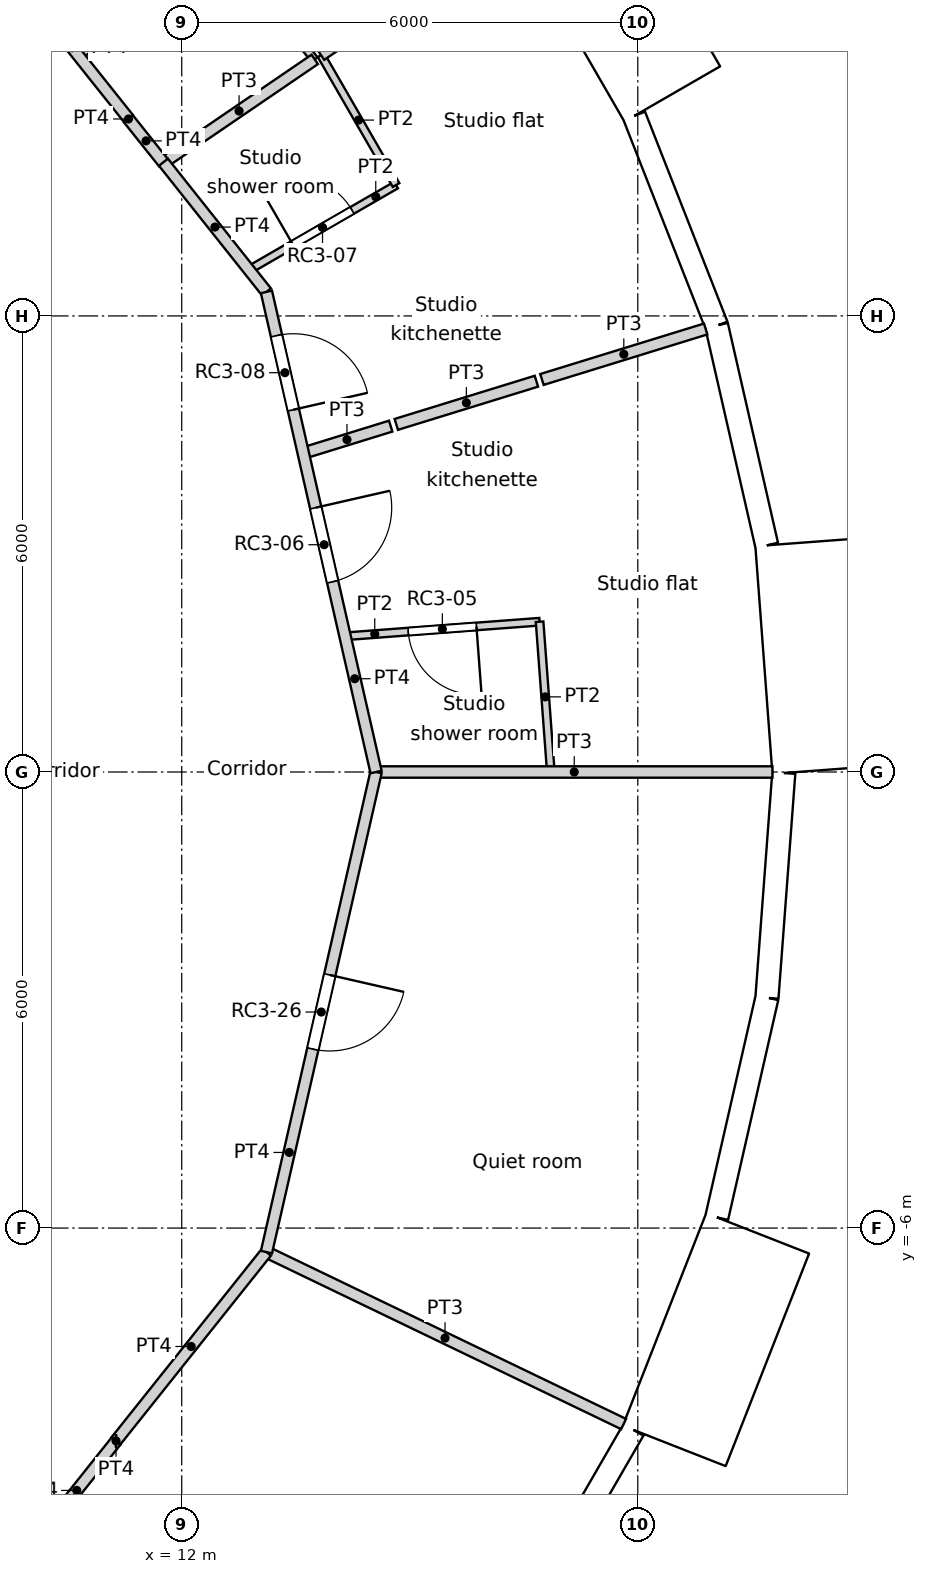
"""IFC4 building model, lengths in metres.
Left out: names, types, materials, properties, quantities, classifications, styles, units other than length and angle.
Written with IfcOpenShell. Run it as: python <this file> out.ifc"""

import sys

from ifc_helpers import new_model, si_unit, direction, frame, frame_2d, origin, origin_2d, place, context, subcontext, project, spatial, rectangle, circle, extrude, element, fill, save


model = new_model("IFC4")
c1 = context("Model", 3, precision=1e-05, world=origin(), true_north=direction((0.0, 1.0)))
c2 = subcontext(c1, "Body", "Model", "MODEL_VIEW")
j1 = project(units=[si_unit("LENGTHUNIT", "METRE"), si_unit("PLANEANGLEUNIT", "RADIAN")], contexts=[c1])
p1 = place(None, origin())
s1 = spatial("IfcSite", under=j1, at=p1, CompositionType="ELEMENT")
p2 = place(p1, origin())
s2 = spatial("IfcBuilding", under=s1, at=p2, CompositionType="ELEMENT")
p3 = place(p2, frame((0.0, 0.0, 252.6)))
s3 = spatial("IfcBuildingStorey", under=s2, at=p3, CompositionType="ELEMENT", Elevation=252.6)
for number, where, z_axis, x_axis in (
    (1, (18.822, 0.0, 0.0), (0.0, 0.0, 1.0), (1.0, 0.0, 0.0)),
    (2, (17.986, 5.548, 0.0), (0.0, 0.0, 1.0), (1.0, 0.0, 0.0)),
    (3, (17.986, -5.548, 0.0), (0.0, 0.0, 1.0), (1.0, 0.0, 0.0)),
):
    element("IfcColumn", number, at=place(p3, frame(where, z_axis=z_axis, x_axis=x_axis)), inside=s3, PredefinedType="COLUMN", context=c2, shape_type="SweptSolid", body=[
        extrude(circle(Radius=0.55, at=origin_2d()), origin(), (0.0, 0.0, 1.0), 3.6),
    ])
p4 = place(p3, frame((20.496, 0.032, -0.35), z_axis=(0.0, 0.0, 1.0), x_axis=(-0.074785902127, 0.997199613339, 0.0)))
e4 = element("IfcWall", 4, at=p4, inside=s3, PredefinedType="ELEMENTEDWALL", context=c2, shape_type="SweptSolid", body=[
    extrude(rectangle(XDim=3.0, YDim=1.45, at=frame_2d((1.5, 0.0))), origin(), (0.0, 0.0, 1.0), 3.6),
])
p5 = place(p4, frame((1.5, 0.0, 1.9)))
e5 = element("IfcOpeningElement", 5, at=p5, cuts=e4, PredefinedType="OPENING", context=c2, shape_type="SweptSolid", body=[
    extrude(circle(Radius=0.9, at=origin_2d()), frame((0.0, 0.735, 0.0), z_axis=(0.0, -1.0, 0.0), x_axis=(1.0, 0.0, 0.0)), (0.0, 0.0, 1.0), 1.47),
])
p6 = place(p3, frame((19.696, 2.984, 0.0), z_axis=(0.0, 0.0, 1.0), x_axis=(-0.222529389789, 0.974925982155, 0.0)))
e6 = element("IfcWall", 6, at=p6, inside=s3, PredefinedType="SOLIDWALL", context=c2, shape_type="SweptSolid", body=[
    extrude(rectangle(XDim=2.962, YDim=0.3, at=frame_2d((1.481, 0.0))), origin(), (0.0, 0.0, 1.0), 3.25),
])
p7 = place(p6, frame((1.481, 0.0, 1.55)))
e7 = element("IfcOpeningElement", 7, at=p7, cuts=e6, PredefinedType="OPENING", context=c2, shape_type="SweptSolid", body=[
    extrude(circle(Radius=0.9, at=origin_2d()), frame((0.0, 0.16, 0.0), z_axis=(0.0, -1.0, 0.0), x_axis=(1.0, 0.0, 0.0)), (0.0, 0.0, 1.0), 0.32),
])
p8 = place(p3, frame((19.037, 5.872, 0.0), z_axis=(0.0, 0.0, 1.0), x_axis=(-0.36530043032, 0.930889679612, 0.0)))
e8 = element("IfcWall", 8, at=p8, inside=s3, PredefinedType="SOLIDWALL", context=c2, shape_type="SweptSolid", body=[
    extrude(rectangle(XDim=2.962, YDim=0.3, at=frame_2d((1.481, 0.0))), origin(), (0.0, 0.0, 1.0), 3.25),
])
p9 = place(p8, frame((1.481, 0.0, 1.55)))
e9 = element("IfcOpeningElement", 9, at=p9, cuts=e8, PredefinedType="OPENING", context=c2, shape_type="SweptSolid", body=[
    extrude(circle(Radius=0.9, at=origin_2d()), frame((0.0, 0.16, 0.0), z_axis=(0.0, -1.0, 0.0), x_axis=(1.0, 0.0, 0.0)), (0.0, 0.0, 1.0), 0.32),
])
p10 = place(p3, frame((18.452, 8.921, -0.35), z_axis=(0.0, 0.0, 1.0), x_axis=(-0.499990139034, 0.866031096941, 0.0)))
e10 = element("IfcWall", 10, at=p10, inside=s3, PredefinedType="ELEMENTEDWALL", context=c2, shape_type="SweptSolid", body=[
    extrude(rectangle(XDim=3.0, YDim=1.45, at=frame_2d((1.5, 0.0))), origin(), (0.0, 0.0, 1.0), 3.6),
])
p11 = place(p10, frame((1.5, 0.0, 1.9)))
e11 = element("IfcOpeningElement", 11, at=p11, cuts=e10, PredefinedType="OPENING", context=c2, shape_type="SweptSolid", body=[
    extrude(circle(Radius=0.9, at=origin_2d()), frame((0.0, 0.735, 0.0), z_axis=(0.0, -1.0, 0.0), x_axis=(1.0, 0.0, 0.0)), (0.0, 0.0, 1.0), 1.47),
])
p12 = place(p3, frame((16.46, -11.222, 0.0), z_axis=(0.0, 0.0, 1.0), x_axis=(0.499950756475, 0.86605383268, 0.0)))
e12 = element("IfcWall", 12, at=p12, inside=s3, PredefinedType="SOLIDWALL", context=c2, shape_type="SweptSolid", body=[
    extrude(rectangle(XDim=2.962, YDim=0.3, at=frame_2d((1.481, 0.0))), origin(), (0.0, 0.0, 1.0), 3.25),
])
p13 = place(p12, frame((1.481, 0.0, 1.55)))
e13 = element("IfcOpeningElement", 13, at=p13, cuts=e12, PredefinedType="OPENING", context=c2, shape_type="SweptSolid", body=[
    extrude(circle(Radius=0.9, at=origin_2d()), frame((0.0, 0.16, 0.0), z_axis=(0.0, -1.0, 0.0), x_axis=(1.0, 0.0, 0.0)), (0.0, 0.0, 1.0), 0.32),
])
p14 = place(p3, frame((18.48, -8.864, -0.35), z_axis=(0.0, 0.0, 1.0), x_axis=(0.36537792632, 0.93085926485, 0.0)))
e14 = element("IfcWall", 14, at=p14, inside=s3, PredefinedType="ELEMENTEDWALL", context=c2, shape_type="SweptSolid", body=[
    extrude(rectangle(XDim=3.0, YDim=1.45, at=frame_2d((1.5, 0.0))), origin(), (0.0, 0.0, 1.0), 3.6),
])
p15 = place(p14, frame((1.5, 0.0, 1.9)))
e15 = element("IfcOpeningElement", 15, at=p15, cuts=e14, PredefinedType="OPENING", context=c2, shape_type="SweptSolid", body=[
    extrude(circle(Radius=0.9, at=origin_2d()), frame((0.0, 0.735, 0.0), z_axis=(0.0, -1.0, 0.0), x_axis=(1.0, 0.0, 0.0)), (0.0, 0.0, 1.0), 1.47),
])
p16 = place(p3, frame((19.04, -5.857, 0.0), z_axis=(0.0, 0.0, 1.0), x_axis=(0.222529389789, 0.974925982155, 0.0)))
e16 = element("IfcWall", 16, at=p16, inside=s3, PredefinedType="SOLIDWALL", context=c2, shape_type="SweptSolid", body=[
    extrude(rectangle(XDim=2.962, YDim=0.3, at=frame_2d((1.481, 0.0))), origin(), (0.0, 0.0, 1.0), 3.25),
])
p17 = place(p16, frame((1.481, 0.0, 1.55)))
e17 = element("IfcOpeningElement", 17, at=p17, cuts=e16, PredefinedType="OPENING", context=c2, shape_type="SweptSolid", body=[
    extrude(circle(Radius=0.9, at=origin_2d()), frame((0.0, 0.16, 0.0), z_axis=(0.0, -1.0, 0.0), x_axis=(1.0, 0.0, 0.0)), (0.0, 0.0, 1.0), 0.32),
])
p18 = place(p3, frame((19.699, -2.969, 0.0), z_axis=(0.0, 0.0, 1.0), x_axis=(0.07474897196, 0.997202382263, 0.0)))
e18 = element("IfcWall", 18, at=p18, inside=s3, PredefinedType="SOLIDWALL", context=c2, shape_type="SweptSolid", body=[
    extrude(rectangle(XDim=2.962, YDim=0.3, at=frame_2d((1.481, 0.0))), origin(), (0.0, 0.0, 1.0), 3.25),
])
p19 = place(p18, frame((1.481, 0.0, 1.55)))
e19 = element("IfcOpeningElement", 19, at=p19, cuts=e18, PredefinedType="OPENING", context=c2, shape_type="SweptSolid", body=[
    extrude(circle(Radius=0.9, at=origin_2d()), frame((0.0, 0.16, 0.0), z_axis=(0.0, -1.0, 0.0), x_axis=(1.0, 0.0, 0.0)), (0.0, 0.0, 1.0), 0.32),
])
p20 = place(p3, frame((9.079, 11.384, 0.0), z_axis=(0.0, 0.0, 1.0), x_axis=(0.623165080354, -0.782090328944, 0.0)))
e20 = element("IfcWall", 20, at=p20, inside=s3, PredefinedType="PARTITIONING", context=c2, shape_type="SweptSolid", body=[
    extrude(rectangle(XDim=3.564, YDim=0.15, at=frame_2d((1.782, 0.0))), origin(), (0.0, 0.0, 1.0), 3.25),
])
p21 = place(p20, frame((0.332, 0.0, 0.0)))
e21 = element("IfcOpeningElement", 21, at=p21, cuts=e20, PredefinedType="OPENING", context=c2, shape_type="SweptSolid", body=[
    extrude(rectangle(XDim=1.0, YDim=2.1, at=frame_2d((0.5, 1.05))), frame((0.0, 0.075, 0.0), z_axis=(0.0, -1.0, 0.0), x_axis=(1.0, 0.0, 0.0)), (0.0, 0.0, 1.0), 0.15),
])
p22 = place(p3, frame((11.3, 8.586, 0.0), z_axis=(0.0, 0.0, 1.0), x_axis=(0.0, 1.0, 0.0)))
e22 = element("IfcWall", 22, at=p22, inside=s3, PredefinedType="PARTITIONING", context=c2, shape_type="SweptSolid", body=[
    extrude(rectangle(XDim=0.01, YDim=0.15, at=frame_2d((0.005, 0.0))), origin(), (0.0, 0.0, 1.0), 3.25),
])
p23 = place(p3, frame((11.137, -8.8, 0.0), z_axis=(0.0, 0.0, 1.0), x_axis=(-1.0, 0.0, 0.0)))
e23 = element("IfcWall", 23, at=p23, inside=s3, PredefinedType="PARTITIONING", context=c2, shape_type="SweptSolid", body=[
    extrude(rectangle(XDim=0.003, YDim=0.15, at=frame_2d((0.001, 0.0))), origin(), (0.0, 0.0, 1.0), 3.25),
])
p24 = place(p3, frame((10.101, -10.101, 0.0), z_axis=(0.0, 0.0, 1.0), x_axis=(0.623098344652, 0.782143498913, 0.0)))
e24 = element("IfcWall", 24, at=p24, inside=s3, PredefinedType="PARTITIONING", context=c2, shape_type="SweptSolid", body=[
    extrude(rectangle(XDim=1.661, YDim=0.15, at=frame_2d((0.831, 0.0))), origin(), (0.0, 0.0, 1.0), 3.25),
])
p25 = place(p3, frame((13.115, 6.316, 0.0), z_axis=(0.0, 0.0, 1.0), x_axis=(0.222568978642, -0.97491694505, 0.0)))
e25 = element("IfcWall", 25, at=p25, inside=s3, PredefinedType="PARTITIONING", context=c2, shape_type="SweptSolid", body=[
    extrude(rectangle(XDim=6.479, YDim=0.15, at=frame_2d((3.239, 0.0))), origin(), (0.0, 0.0, 1.0), 3.25),
])
p26 = place(p25, frame((2.911, 0.0, 0.0)))
e26 = element("IfcOpeningElement", 26, at=p26, cuts=e25, PredefinedType="OPENING", context=c2, shape_type="SweptSolid", body=[
    extrude(rectangle(XDim=1.0, YDim=2.1, at=frame_2d((0.5, 1.05))), frame((0.0, 0.075, 0.0), z_axis=(0.0, -1.0, 0.0), x_axis=(1.0, 0.0, 0.0)), (0.0, 0.0, 1.0), 0.15),
])
p27 = place(p25, frame((0.59, 0.0, 0.0)))
e27 = element("IfcOpeningElement", 27, at=p27, cuts=e25, PredefinedType="OPENING", context=c2, shape_type="SweptSolid", body=[
    extrude(rectangle(XDim=1.0, YDim=2.1, at=frame_2d((0.5, 1.05))), frame((0.0, 0.075, 0.0), z_axis=(0.0, -1.0, 0.0), x_axis=(1.0, 0.0, 0.0)), (0.0, 0.0, 1.0), 0.15),
])
p28 = place(p3, frame((11.76, 8.022, 0.0), z_axis=(0.0, 0.0, 1.0), x_axis=(0.62206805366, -0.782963177049, 0.0)))
e28 = element("IfcWall", 28, at=p28, inside=s3, PredefinedType="PARTITIONING", context=c2, shape_type="SweptSolid", body=[
    extrude(rectangle(XDim=2.179, YDim=0.15, at=frame_2d((1.089, 0.0))), origin(), (0.0, 0.0, 1.0), 3.25),
])
p29 = place(p3, frame((11.3, 8.592, 0.0), z_axis=(0.0, 0.0, 1.0), x_axis=(0.623405636383, -0.781898594785, 0.0)))
e29 = element("IfcWall", 29, at=p29, inside=s3, PredefinedType="PARTITIONING", context=c2, shape_type="SweptSolid", body=[
    extrude(rectangle(XDim=0.74, YDim=0.15, at=frame_2d((0.37, 0.0))), origin(), (0.0, 0.0, 1.0), 3.25),
])
p30 = place(p3, frame((11.134, -8.8, 0.0), z_axis=(0.0, 0.0, 1.0), x_axis=(0.623476099415, 0.781842409606, 0.0)))
e30 = element("IfcWall", 30, at=p30, inside=s3, PredefinedType="PARTITIONING", context=c2, shape_type="SweptSolid", body=[
    extrude(rectangle(XDim=3.177, YDim=0.15, at=frame_2d((1.589, 0.0))), origin(), (0.0, 0.0, 1.0), 3.25),
])
p31 = place(p3, frame((13.115, -6.316, 0.0), z_axis=(0.0, 0.0, 1.0), x_axis=(0.222568978642, 0.97491694505, 0.0)))
e31 = element("IfcWall", 31, at=p31, inside=s3, PredefinedType="PARTITIONING", context=c2, shape_type="SweptSolid", body=[
    extrude(rectangle(XDim=6.479, YDim=0.15, at=frame_2d((3.239, 0.0))), origin(), (0.0, 0.0, 1.0), 3.25),
])
p32 = place(p31, frame((2.74, 0.0, 0.0)))
e32 = element("IfcOpeningElement", 32, at=p32, cuts=e31, PredefinedType="OPENING", context=c2, shape_type="SweptSolid", body=[
    extrude(rectangle(XDim=1.0, YDim=2.04, at=frame_2d((0.5, 1.02))), frame((0.0, 0.075, 0.0), z_axis=(0.0, -1.0, 0.0), x_axis=(1.0, 0.0, 0.0)), (0.0, 0.0, 1.0), 0.15),
])
p33 = place(p3, frame((16.708, 1.977, 0.0), z_axis=(0.0, 0.0, 1.0), x_axis=(0.074624634103, -0.997211694669, 0.0)))
e33 = element("IfcWall", 33, at=p33, inside=s3, PredefinedType="PARTITIONING", context=c2, shape_type="SweptSolid", body=[
    extrude(rectangle(XDim=1.983, YDim=0.1, at=frame_2d((0.991, 0.0))), origin(), (0.0, 0.0, 1.0), 3.25),
])
p34 = place(p3, frame((14.149, 1.785, 0.0), z_axis=(0.0, 0.0, 1.0), x_axis=(0.997193275785, 0.074870359477, 0.0)))
e34 = element("IfcWall", 34, at=p34, inside=s3, PredefinedType="PARTITIONING", context=c2, shape_type="SweptSolid", body=[
    extrude(rectangle(XDim=2.566, YDim=0.1, at=frame_2d((1.283, 0.0))), origin(), (0.0, 0.0, 1.0), 3.25),
])
p35 = place(p34, frame((0.833, 0.0, 0.0)))
e35 = element("IfcOpeningElement", 35, at=p35, cuts=e34, PredefinedType="OPENING", context=c2, shape_type="SweptSolid", body=[
    extrude(rectangle(XDim=0.9, YDim=2.04, at=frame_2d((0.45, 1.02))), frame((0.0, 0.05, 0.0), z_axis=(0.0, -1.0, 0.0), x_axis=(1.0, 0.0, 0.0)), (0.0, 0.0, 1.0), 0.1),
])
p36 = place(p3, frame((13.599, 4.195, 0.0), z_axis=(0.0, 0.0, 1.0), x_axis=(0.955506647746, 0.294969568115, 0.0)))
e36 = element("IfcWall", 36, at=p36, inside=s3, PredefinedType="PARTITIONING", context=c2, shape_type="SweptSolid", body=[
    extrude(rectangle(XDim=1.203, YDim=0.15, at=frame_2d((0.602, 0.0))), origin(), (0.0, 0.0, 1.0), 3.25),
])
p37 = place(p3, frame((16.739, 5.164, 0.0), z_axis=(0.0, 0.0, 1.0), x_axis=(0.955650111791, 0.294504437715, 0.0)))
e37 = element("IfcWall", 37, at=p37, inside=s3, PredefinedType="PARTITIONING", context=c2, shape_type="SweptSolid", body=[
    extrude(rectangle(XDim=2.254, YDim=0.15, at=frame_2d((1.127, 0.0))), origin(), (0.0, 0.0, 1.0), 3.25),
])
p38 = place(p3, frame((14.557, 0.0, 0.0), z_axis=(0.0, 0.0, 1.0), x_axis=(1.0, 0.0, 0.0)))
e38 = element("IfcWall", 38, at=p38, inside=s3, PredefinedType="PARTITIONING", context=c2, shape_type="SweptSolid", body=[
    extrude(rectangle(XDim=5.214, YDim=0.15, at=frame_2d((2.607, 0.0))), origin(), (0.0, 0.0, 1.0), 3.25),
])
p39 = place(p3, frame((14.823, 4.573, 0.0), z_axis=(0.0, 0.0, 1.0), x_axis=(0.955628343972, 0.294575063773, 0.0)))
e39 = element("IfcWall", 39, at=p39, inside=s3, PredefinedType="PARTITIONING", context=c2, shape_type="SweptSolid", body=[
    extrude(rectangle(XDim=1.929, YDim=0.15, at=frame_2d((0.964, 0.0))), origin(), (0.0, 0.0, 1.0), 3.25),
])
p40 = place(p3, frame((12.885, 6.605, 0.0), z_axis=(0.0, 0.0, 1.0), x_axis=(0.866076416361, 0.499911633214, 0.0)))
e40 = element("IfcWall", 40, at=p40, inside=s3, PredefinedType="PARTITIONING", context=c2, shape_type="SweptSolid", body=[
    extrude(rectangle(XDim=2.234, YDim=0.1, at=frame_2d((1.117, 0.0))), origin(), (0.0, 0.0, 1.0), 3.25),
])
p41 = place(p40, frame((0.667, 0.0, 0.0)))
e41 = element("IfcOpeningElement", 41, at=p41, cuts=e40, PredefinedType="OPENING", context=c2, shape_type="SweptSolid", body=[
    extrude(rectangle(XDim=0.9, YDim=2.04, at=frame_2d((0.45, 1.02))), frame((0.0, 0.05, 0.0), z_axis=(0.0, -1.0, 0.0), x_axis=(1.0, 0.0, 0.0)), (0.0, 0.0, 1.0), 0.1),
])
p42 = place(p3, frame((13.833, 9.431, 0.0), z_axis=(0.0, 0.0, 1.0), x_axis=(0.500143626598, -0.865942465048, 0.0)))
e42 = element("IfcWall", 42, at=p42, inside=s3, PredefinedType="PARTITIONING", context=c2, shape_type="SweptSolid", body=[
    extrude(rectangle(XDim=1.974, YDim=0.1, at=frame_2d((0.987, 0.0))), origin(), (0.0, 0.0, 1.0), 3.25),
])
p43 = place(p3, frame((13.833, 9.431, 0.0), z_axis=(0.0, 0.0, 1.0), x_axis=(0.826152320289, 0.56344684193, 0.0)))
e43 = element("IfcWall", 43, at=p43, inside=s3, PredefinedType="PARTITIONING", context=c2, shape_type="SweptSolid", body=[
    extrude(rectangle(XDim=3.03, YDim=0.15, at=frame_2d((1.515, 0.0))), origin(), (0.0, 0.0, 1.0), 3.25),
])
p44 = place(p3, frame((11.759, 8.017, 0.0), z_axis=(0.0, 0.0, 1.0), x_axis=(0.826143746222, 0.563459413426, 0.0)))
e44 = element("IfcWall", 44, at=p44, inside=s3, PredefinedType="PARTITIONING", context=c2, shape_type="SweptSolid", body=[
    extrude(rectangle(XDim=2.41, YDim=0.15, at=frame_2d((1.205, 0.0))), origin(), (0.0, 0.0, 1.0), 3.25),
])
p45 = place(p3, frame((12.522, 10.91, 0.0), z_axis=(0.0, 0.0, 1.0), x_axis=(0.623330716607, -0.781958322249, 0.0)))
e45 = element("IfcWall", 45, at=p45, inside=s3, PredefinedType="PARTITIONING", context=c2, shape_type="SweptSolid", body=[
    extrude(rectangle(XDim=1.965, YDim=0.1, at=frame_2d((0.983, 0.0))), origin(), (0.0, 0.0, 1.0), 3.25),
])
p46 = place(p3, frame((10.645, 9.413, 0.0), z_axis=(0.0, 0.0, 1.0), x_axis=(0.781830263661, 0.623491330191, 0.0)))
e46 = element("IfcWall", 46, at=p46, inside=s3, PredefinedType="PARTITIONING", context=c2, shape_type="SweptSolid", body=[
    extrude(rectangle(XDim=2.401, YDim=0.1, at=frame_2d((1.2, 0.0))), origin(), (0.0, 0.0, 1.0), 3.25),
])
p47 = place(p46, frame((0.751, 0.0, 0.0)))
e47 = element("IfcOpeningElement", 47, at=p47, cuts=e46, PredefinedType="OPENING", context=c2, shape_type="SweptSolid", body=[
    extrude(rectangle(XDim=0.9, YDim=2.04, at=frame_2d((0.45, 1.02))), frame((0.0, 0.05, 0.0), z_axis=(0.0, -1.0, 0.0), x_axis=(1.0, 0.0, 0.0)), (0.0, 0.0, 1.0), 0.1),
])
p48 = place(p3, frame((13.115, -6.316, 0.0), z_axis=(0.0, 0.0, 1.0), x_axis=(0.901004381064, -0.433809987557, 0.0)))
e48 = element("IfcWall", 48, at=p48, inside=s3, PredefinedType="PARTITIONING", context=c2, shape_type="SweptSolid", body=[
    extrude(rectangle(XDim=5.214, YDim=0.15, at=frame_2d((2.607, 0.0))), origin(), (0.0, 0.0, 1.0), 3.25),
])
p49 = place(p5, origin())
e49 = element("IfcWindow", 49, at=p49, inside=s3, PartitioningType="SINGLE_PANEL", PredefinedType="WINDOW", context=c2, shape_type="SweptSolid", body=[
    extrude(circle(Radius=0.9, at=origin_2d()), frame((0.0, 0.695, 0.0), z_axis=(0.0, -1.0, 0.0), x_axis=(1.0, 0.0, 0.0)), (0.0, 0.0, 1.0), 0.1),
])
fill(e5, e49)
p50 = place(p7, origin())
e50 = element("IfcWindow", 50, at=p50, inside=s3, PartitioningType="SINGLE_PANEL", PredefinedType="WINDOW", context=c2, shape_type="SweptSolid", body=[
    extrude(circle(Radius=0.9, at=origin_2d()), frame((0.0, 0.12, 0.0), z_axis=(0.0, -1.0, 0.0), x_axis=(1.0, 0.0, 0.0)), (0.0, 0.0, 1.0), 0.1),
])
fill(e7, e50)
p51 = place(p9, origin())
e51 = element("IfcWindow", 51, at=p51, inside=s3, PartitioningType="SINGLE_PANEL", PredefinedType="WINDOW", context=c2, shape_type="SweptSolid", body=[
    extrude(circle(Radius=0.9, at=origin_2d()), frame((0.0, 0.12, 0.0), z_axis=(0.0, -1.0, 0.0), x_axis=(1.0, 0.0, 0.0)), (0.0, 0.0, 1.0), 0.1),
])
fill(e9, e51)
p52 = place(p11, origin())
e52 = element("IfcWindow", 52, at=p52, inside=s3, PartitioningType="SINGLE_PANEL", PredefinedType="WINDOW", context=c2, shape_type="SweptSolid", body=[
    extrude(circle(Radius=0.9, at=origin_2d()), frame((0.0, 0.695, 0.0), z_axis=(0.0, -1.0, 0.0), x_axis=(1.0, 0.0, 0.0)), (0.0, 0.0, 1.0), 0.1),
])
fill(e11, e52)
p53 = place(p13, origin())
e53 = element("IfcWindow", 53, at=p53, inside=s3, PartitioningType="SINGLE_PANEL", PredefinedType="WINDOW", context=c2, shape_type="SweptSolid", body=[
    extrude(circle(Radius=0.9, at=origin_2d()), frame((0.0, 0.12, 0.0), z_axis=(0.0, -1.0, 0.0), x_axis=(1.0, 0.0, 0.0)), (0.0, 0.0, 1.0), 0.1),
])
fill(e13, e53)
p54 = place(p15, origin())
e54 = element("IfcWindow", 54, at=p54, inside=s3, PartitioningType="SINGLE_PANEL", PredefinedType="WINDOW", context=c2, shape_type="SweptSolid", body=[
    extrude(circle(Radius=0.9, at=origin_2d()), frame((0.0, 0.695, 0.0), z_axis=(0.0, -1.0, 0.0), x_axis=(1.0, 0.0, 0.0)), (0.0, 0.0, 1.0), 0.1),
])
fill(e15, e54)
p55 = place(p17, origin())
e55 = element("IfcWindow", 55, at=p55, inside=s3, PartitioningType="SINGLE_PANEL", PredefinedType="WINDOW", context=c2, shape_type="SweptSolid", body=[
    extrude(circle(Radius=0.9, at=origin_2d()), frame((0.0, 0.12, 0.0), z_axis=(0.0, -1.0, 0.0), x_axis=(1.0, 0.0, 0.0)), (0.0, 0.0, 1.0), 0.1),
])
fill(e17, e55)
p56 = place(p19, origin())
e56 = element("IfcWindow", 56, at=p56, inside=s3, PartitioningType="SINGLE_PANEL", PredefinedType="WINDOW", context=c2, shape_type="SweptSolid", body=[
    extrude(circle(Radius=0.9, at=origin_2d()), frame((0.0, 0.12, 0.0), z_axis=(0.0, -1.0, 0.0), x_axis=(1.0, 0.0, 0.0)), (0.0, 0.0, 1.0), 0.1),
])
fill(e19, e56)
p57 = place(p35, origin())
e57 = element("IfcDoor", 57, at=p57, inside=s3, OperationType="SINGLE_SWING_LEFT", PredefinedType="DOOR", context=c2, shape_type="SweptSolid", body=[
    extrude(rectangle(XDim=0.9, YDim=2.04, at=frame_2d((0.45, 1.02))), frame((0.0, 0.025, 0.0), z_axis=(0.0, -1.0, 0.0), x_axis=(1.0, 0.0, 0.0)), (0.0, 0.0, 1.0), 0.05),
])
fill(e35, e57)
p58 = place(p26, origin())
e58 = element("IfcDoor", 58, at=p58, inside=s3, OperationType="SINGLE_SWING_LEFT", PredefinedType="DOOR", context=c2, shape_type="SweptSolid", body=[
    extrude(rectangle(XDim=1.0, YDim=2.1, at=frame_2d((0.5, 1.05))), frame((0.0, 0.025, 0.0), z_axis=(0.0, -1.0, 0.0), x_axis=(1.0, 0.0, 0.0)), (0.0, 0.0, 1.0), 0.05),
])
fill(e26, e58)
p59 = place(p41, origin())
e59 = element("IfcDoor", 59, at=p59, inside=s3, OperationType="SINGLE_SWING_LEFT", PredefinedType="DOOR", context=c2, shape_type="SweptSolid", body=[
    extrude(rectangle(XDim=0.9, YDim=2.04, at=frame_2d((0.45, 1.02))), frame((0.0, 0.025, 0.0), z_axis=(0.0, -1.0, 0.0), x_axis=(1.0, 0.0, 0.0)), (0.0, 0.0, 1.0), 0.05),
])
fill(e41, e59)
p60 = place(p27, origin())
e60 = element("IfcDoor", 60, at=p60, inside=s3, OperationType="SINGLE_SWING_RIGHT", PredefinedType="DOOR", context=c2, shape_type="SweptSolid", body=[
    extrude(rectangle(XDim=1.0, YDim=2.1, at=frame_2d((0.5, 1.05))), frame((0.0, 0.025, 0.0), z_axis=(0.0, -1.0, 0.0), x_axis=(1.0, 0.0, 0.0)), (0.0, 0.0, 1.0), 0.05),
])
fill(e27, e60)
p61 = place(p32, origin())
e61 = element("IfcDoor", 61, at=p61, inside=s3, OperationType="SINGLE_SWING_LEFT", PredefinedType="DOOR", context=c2, shape_type="SweptSolid", body=[
    extrude(rectangle(XDim=1.0, YDim=2.04, at=frame_2d((0.5, 1.02))), frame((0.0, 0.025, 0.0), z_axis=(0.0, -1.0, 0.0), x_axis=(1.0, 0.0, 0.0)), (0.0, 0.0, 1.0), 0.05),
])
fill(e32, e61)
save(model, sys.argv[1])
